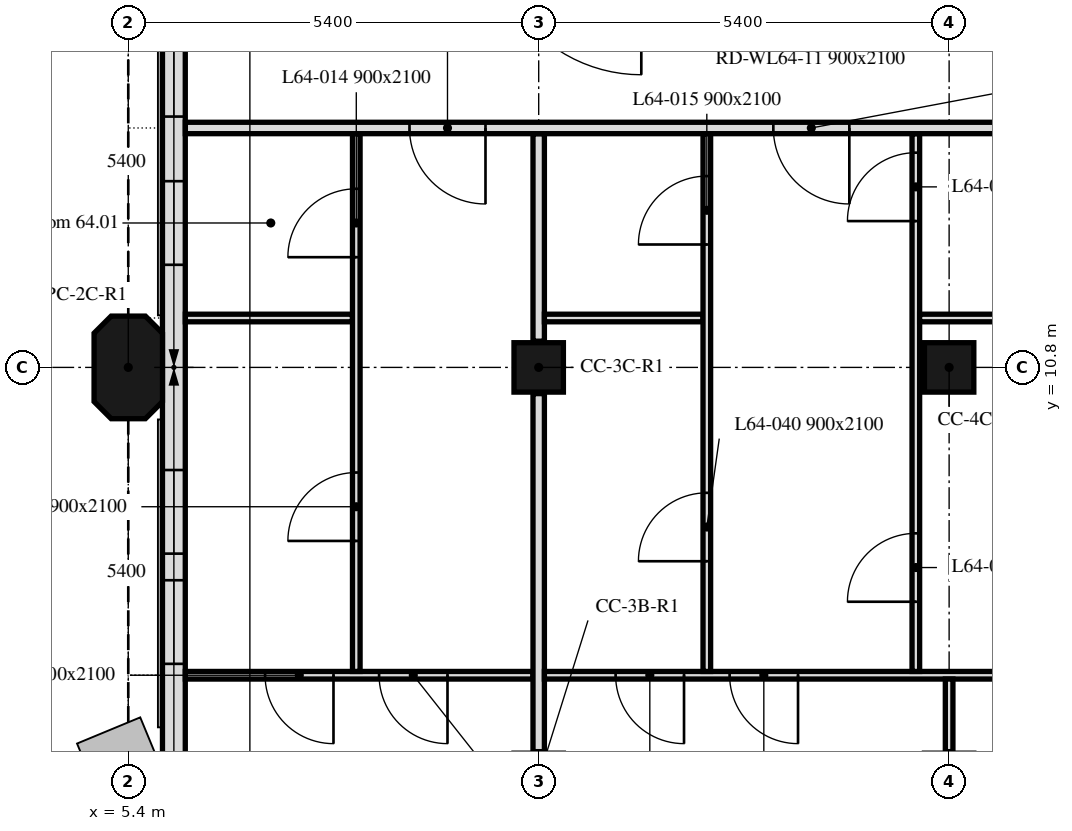
"""IFC4 building model, lengths in metres.
Left out: names, types, materials, properties, quantities, classifications, styles, units other than length and angle.
Written with IfcOpenShell. Run it as: python <this file> out.ifc"""

import sys

from ifc_helpers import new_model, si_unit, direction, frame, frame_2d, origin, origin_2d, place, context, subcontext, project, spatial, polyline, rectangle, outline, extrude, element, fill, save


model = new_model("IFC4")
c1 = context("Model", 3, precision=1e-05, world=origin(), true_north=direction((0.0, 1.0)))
c2 = subcontext(c1, "Body", "Model", "MODEL_VIEW")
j1 = project(units=[si_unit("LENGTHUNIT", "METRE"), si_unit("PLANEANGLEUNIT", "RADIAN")], contexts=[c1])
p1 = place(None, origin())
s1 = spatial("IfcSite", under=j1, at=p1, CompositionType="ELEMENT")
p2 = place(p1, origin())
s2 = spatial("IfcBuilding", under=s1, at=p2, CompositionType="ELEMENT")
p3 = place(p2, frame((0.0, 0.0, 265.3)))
s3 = spatial("IfcBuildingStorey", under=s2, at=p3, CompositionType="ELEMENT", Elevation=265.3)
p4 = place(p3, frame((5.4, 10.8, 0.0), z_axis=(0.0, 0.0, 1.0), x_axis=(0.0, 1.0, 0.0)))
e1 = element("IfcColumn", 1, at=p4, inside=s3, PredefinedType="COLUMN", context=c2, shape_type="SweptSolid", body=[
    extrude(outline(polyline([(-0.45, -0.45), (0.45, -0.45), (0.675, -0.225), (0.675, 0.225), (0.45, 0.45), (-0.45, 0.45), (-0.675, 0.225), (-0.675, -0.225), (-0.45, -0.45)])), origin(), (0.0, 0.0, 1.0), 3.0),
])
for number, where, z_axis, x_axis in (
    (2, (10.8, 10.8, 0.0), (0.0, 0.0, 1.0), (1.0, 0.0, 0.0)),
    (3, (16.2, 10.8, 0.0), (0.0, 0.0, 1.0), (1.0, 0.0, 0.0)),
):
    element("IfcColumn", number, at=place(p3, frame(where, z_axis=z_axis, x_axis=x_axis)), inside=s3, PredefinedType="COLUMN", context=c2, shape_type="SweptSolid", body=[
        extrude(rectangle(XDim=0.65, YDim=0.65, at=origin_2d()), origin(), (0.0, 0.0, 1.0), 3.0),
    ])
p5 = place(p3, frame((6.0, 16.2, 0.0), z_axis=(0.0, 0.0, 1.0), x_axis=(0.0, -1.0, 0.0)))
e4 = element("IfcWall", 4, at=p5, inside=s3, PredefinedType="SOLIDWALL", context=c2, shape_type="SweptSolid", body=[
    extrude(rectangle(XDim=10.614, YDim=0.3, at=frame_2d((5.307, 0.0))), origin(), (0.0, 0.0, 1.0), 3.0),
])
p6 = place(p5, frame((1.0, 0.0, 0.9)))
e5 = element("IfcOpeningElement", 5, at=p6, cuts=e4, PredefinedType="OPENING", context=c2, shape_type="SweptSolid", body=[
    extrude(rectangle(XDim=1.1, YDim=1.7, at=frame_2d((0.55, 0.85))), frame((0.0, 0.16, 0.0), z_axis=(0.0, -1.0, 0.0), x_axis=(1.0, 0.0, 0.0)), (0.0, 0.0, 1.0), 0.32),
])
p7 = place(p5, frame((2.95, 0.0, 0.9)))
e6 = element("IfcOpeningElement", 6, at=p7, cuts=e4, PredefinedType="OPENING", context=c2, shape_type="SweptSolid", body=[
    extrude(rectangle(XDim=1.1, YDim=1.7, at=frame_2d((0.55, 0.85))), frame((0.0, 0.16, 0.0), z_axis=(0.0, -1.0, 0.0), x_axis=(1.0, 0.0, 0.0)), (0.0, 0.0, 1.0), 0.32),
])
p8 = place(p5, frame((6.75, 0.0, 0.9)))
e7 = element("IfcOpeningElement", 7, at=p8, cuts=e4, PredefinedType="OPENING", context=c2, shape_type="SweptSolid", body=[
    extrude(rectangle(XDim=1.1, YDim=1.7, at=frame_2d((0.55, 0.85))), frame((0.0, 0.16, 0.0), z_axis=(0.0, -1.0, 0.0), x_axis=(1.0, 0.0, 0.0)), (0.0, 0.0, 1.0), 0.32),
])
p9 = place(p5, frame((8.2, 0.0, 0.9)))
e8 = element("IfcOpeningElement", 8, at=p9, cuts=e4, PredefinedType="OPENING", context=c2, shape_type="SweptSolid", body=[
    extrude(rectangle(XDim=1.1, YDim=1.7, at=frame_2d((0.55, 0.85))), frame((0.0, 0.16, 0.0), z_axis=(0.0, -1.0, 0.0), x_axis=(1.0, 0.0, 0.0)), (0.0, 0.0, 1.0), 0.32),
])
p10 = place(p3, frame((10.725, 6.75, 0.0), z_axis=(0.0, 0.0, 1.0), x_axis=(-1.0, 0.0, 0.0)))
e9 = element("IfcWall", 9, at=p10, inside=s3, PredefinedType="PARTITIONING", context=c2, shape_type="SweptSolid", body=[
    extrude(rectangle(XDim=4.574, YDim=0.1, at=frame_2d((2.287, 0.0))), origin(), (0.0, 0.0, 1.0), 3.0),
])
p11 = place(p10, frame((2.625, 0.0, 0.0)))
e10 = element("IfcOpeningElement", 10, at=p11, cuts=e9, PredefinedType="OPENING", context=c2, shape_type="SweptSolid", body=[
    extrude(rectangle(XDim=0.9, YDim=2.1, at=frame_2d((0.45, 1.05))), frame((0.0, 0.05, 0.0), z_axis=(0.0, -1.0, 0.0), x_axis=(1.0, 0.0, 0.0)), (0.0, 0.0, 1.0), 0.1),
])
p12 = place(p10, frame((1.125, 0.0, 0.0)))
e11 = element("IfcOpeningElement", 11, at=p12, cuts=e9, PredefinedType="OPENING", context=c2, shape_type="SweptSolid", body=[
    extrude(rectangle(XDim=0.9, YDim=2.1, at=frame_2d((0.45, 1.05))), frame((0.0, 0.05, 0.0), z_axis=(0.0, -1.0, 0.0), x_axis=(1.0, 0.0, 0.0)), (0.0, 0.0, 1.0), 0.1),
])
p13 = place(p3, frame((8.35, 11.45, 0.0), z_axis=(0.0, 0.0, 1.0), x_axis=(-1.0, 0.0, 0.0)))
e12 = element("IfcWall", 12, at=p13, inside=s3, PredefinedType="PARTITIONING", context=c2, shape_type="SweptSolid", body=[
    extrude(rectangle(XDim=2.199, YDim=0.1, at=frame_2d((1.1, 0.0))), origin(), (0.0, 0.0, 1.0), 3.0),
])
p14 = place(p3, frame((8.4, 6.8, 0.0), z_axis=(0.0, 0.0, 1.0), x_axis=(0.0, 1.0, 0.0)))
e13 = element("IfcWall", 13, at=p14, inside=s3, PredefinedType="PARTITIONING", context=c2, shape_type="SweptSolid", body=[
    extrude(rectangle(XDim=7.075, YDim=0.1, at=frame_2d((3.538, 0.0))), origin(), (0.0, 0.0, 1.0), 3.0),
])
p15 = place(p14, frame((5.45, 0.0, 0.0)))
e14 = element("IfcOpeningElement", 14, at=p15, cuts=e13, PredefinedType="OPENING", context=c2, shape_type="SweptSolid", body=[
    extrude(rectangle(XDim=0.9, YDim=2.1, at=frame_2d((0.45, 1.05))), frame((0.0, 0.05, 0.0), z_axis=(0.0, -1.0, 0.0), x_axis=(1.0, 0.0, 0.0)), (0.0, 0.0, 1.0), 0.1),
])
p16 = place(p14, frame((1.717, 0.0, 0.0)))
e15 = element("IfcOpeningElement", 15, at=p16, cuts=e13, PredefinedType="OPENING", context=c2, shape_type="SweptSolid", body=[
    extrude(rectangle(XDim=0.9, YDim=2.1, at=frame_2d((0.45, 1.05))), frame((0.0, 0.05, 0.0), z_axis=(0.0, -1.0, 0.0), x_axis=(1.0, 0.0, 0.0)), (0.0, 0.0, 1.0), 0.1),
])
p17 = place(p3, frame((10.8, 5.745, 0.0), z_axis=(0.0, 0.0, 1.0), x_axis=(0.0, 1.0, 0.0)))
e16 = element("IfcWall", 16, at=p17, inside=s3, PredefinedType="PARTITIONING", context=c2, shape_type="SweptSolid", body=[
    extrude(rectangle(XDim=4.71, YDim=0.15, at=frame_2d((2.355, 0.0))), origin(), (0.0, 0.0, 1.0), 3.0),
])
p18 = place(p3, frame((10.8, 11.145, 0.0), z_axis=(0.0, 0.0, 1.0), x_axis=(0.0, 1.0, 0.0)))
e17 = element("IfcWall", 17, at=p18, inside=s3, PredefinedType="PARTITIONING", context=c2, shape_type="SweptSolid", body=[
    extrude(rectangle(XDim=2.73, YDim=0.15, at=frame_2d((1.365, 0.0))), origin(), (0.0, 0.0, 1.0), 3.0),
])
p19 = place(p3, frame((21.525, 6.75, 0.0), z_axis=(0.0, 0.0, 1.0), x_axis=(-1.0, 0.0, 0.0)))
e18 = element("IfcWall", 18, at=p19, inside=s3, PredefinedType="PARTITIONING", context=c2, shape_type="SweptSolid", body=[
    extrude(rectangle(XDim=10.65, YDim=0.1, at=frame_2d((5.325, 0.0))), origin(), (0.0, 0.0, 1.0), 2.4),
])
p20 = place(p19, frame((8.813, 0.0, 0.0)))
e19 = element("IfcOpeningElement", 19, at=p20, cuts=e18, PredefinedType="OPENING", context=c2, shape_type="SweptSolid", body=[
    extrude(rectangle(XDim=0.9, YDim=2.1, at=frame_2d((0.45, 1.05))), frame((0.0, 0.05, 0.0), z_axis=(0.0, -1.0, 0.0), x_axis=(1.0, 0.0, 0.0)), (0.0, 0.0, 1.0), 0.1),
])
p21 = place(p19, frame((1.675, 0.0, 0.0)))
e20 = element("IfcOpeningElement", 20, at=p21, cuts=e18, PredefinedType="OPENING", context=c2, shape_type="SweptSolid", body=[
    extrude(rectangle(XDim=0.9, YDim=2.1, at=frame_2d((0.45, 1.05))), frame((0.0, 0.05, 0.0), z_axis=(0.0, -1.0, 0.0), x_axis=(1.0, 0.0, 0.0)), (0.0, 0.0, 1.0), 0.1),
])
p22 = place(p19, frame((7.313, 0.0, 0.0)))
e21 = element("IfcOpeningElement", 21, at=p22, cuts=e18, PredefinedType="OPENING", context=c2, shape_type="SweptSolid", body=[
    extrude(rectangle(XDim=0.9, YDim=2.1, at=frame_2d((0.45, 1.05))), frame((0.0, 0.05, 0.0), z_axis=(0.0, -1.0, 0.0), x_axis=(1.0, 0.0, 0.0)), (0.0, 0.0, 1.0), 0.1),
])
p23 = place(p3, frame((16.2, 5.745, 0.0), z_axis=(0.0, 0.0, 1.0), x_axis=(0.0, 1.0, 0.0)))
e22 = element("IfcWall", 22, at=p23, inside=s3, PredefinedType="PARTITIONING", context=c2, shape_type="SweptSolid", body=[
    extrude(rectangle(XDim=0.955, YDim=0.1, at=frame_2d((0.478, 0.0))), origin(), (0.0, 0.0, 1.0), 2.4),
])
p24 = place(p3, frame((12.962, 11.45, 0.0), z_axis=(0.0, 0.0, 1.0), x_axis=(-1.0, 0.0, 0.0)))
e23 = element("IfcWall", 23, at=p24, inside=s3, PredefinedType="PARTITIONING", context=c2, shape_type="SweptSolid", body=[
    extrude(rectangle(XDim=2.087, YDim=0.1, at=frame_2d((1.043, 0.0))), origin(), (0.0, 0.0, 1.0), 3.0),
])
p25 = place(p3, frame((13.012, 6.8, 0.0), z_axis=(0.0, 0.0, 1.0), x_axis=(0.0, 1.0, 0.0)))
e24 = element("IfcWall", 24, at=p25, inside=s3, PredefinedType="PARTITIONING", context=c2, shape_type="SweptSolid", body=[
    extrude(rectangle(XDim=7.075, YDim=0.1, at=frame_2d((3.538, 0.0))), origin(), (0.0, 0.0, 1.0), 3.0),
])
p26 = place(p25, frame((5.617, 0.0, 0.0)))
e25 = element("IfcOpeningElement", 25, at=p26, cuts=e24, PredefinedType="OPENING", context=c2, shape_type="SweptSolid", body=[
    extrude(rectangle(XDim=0.9, YDim=2.1, at=frame_2d((0.45, 1.05))), frame((0.0, 0.05, 0.0), z_axis=(0.0, -1.0, 0.0), x_axis=(1.0, 0.0, 0.0)), (0.0, 0.0, 1.0), 0.1),
])
p27 = place(p25, frame((1.45, 0.0, 0.0)))
e26 = element("IfcOpeningElement", 26, at=p27, cuts=e24, PredefinedType="OPENING", context=c2, shape_type="SweptSolid", body=[
    extrude(rectangle(XDim=0.9, YDim=2.1, at=frame_2d((0.45, 1.05))), frame((0.0, 0.05, 0.0), z_axis=(0.0, -1.0, 0.0), x_axis=(1.0, 0.0, 0.0)), (0.0, 0.0, 1.0), 0.1),
])
p28 = place(p3, frame((15.762, 6.8, 0.0), z_axis=(0.0, 0.0, 1.0), x_axis=(0.0, 1.0, 0.0)))
e27 = element("IfcWall", 27, at=p28, inside=s3, PredefinedType="PARTITIONING", context=c2, shape_type="SweptSolid", body=[
    extrude(rectangle(XDim=7.075, YDim=0.1, at=frame_2d((3.538, 0.0))), origin(), (0.0, 0.0, 1.0), 3.0),
])
p29 = place(p28, frame((0.917, 0.0, 0.0)))
e28 = element("IfcOpeningElement", 28, at=p29, cuts=e27, PredefinedType="OPENING", context=c2, shape_type="SweptSolid", body=[
    extrude(rectangle(XDim=0.9, YDim=2.1, at=frame_2d((0.45, 1.05))), frame((0.0, 0.05, 0.0), z_axis=(0.0, -1.0, 0.0), x_axis=(1.0, 0.0, 0.0)), (0.0, 0.0, 1.0), 0.1),
])
p30 = place(p28, frame((5.925, 0.0, 0.0)))
e29 = element("IfcOpeningElement", 29, at=p30, cuts=e27, PredefinedType="OPENING", context=c2, shape_type="SweptSolid", body=[
    extrude(rectangle(XDim=0.9, YDim=2.1, at=frame_2d((0.45, 1.05))), frame((0.0, 0.05, 0.0), z_axis=(0.0, -1.0, 0.0), x_axis=(1.0, 0.0, 0.0)), (0.0, 0.0, 1.0), 0.1),
])
p31 = place(p3, frame((21.525, 11.45, 0.0), z_axis=(0.0, 0.0, 1.0), x_axis=(-1.0, 0.0, 0.0)))
e30 = element("IfcWall", 30, at=p31, inside=s3, PredefinedType="PARTITIONING", context=c2, shape_type="SweptSolid", body=[
    extrude(rectangle(XDim=5.713, YDim=0.1, at=frame_2d((2.856, 0.0))), origin(), (0.0, 0.0, 1.0), 2.4),
])
p32 = place(p31, frame((1.675, 0.0, 0.0)))
e31 = element("IfcOpeningElement", 31, at=p32, cuts=e30, PredefinedType="OPENING", context=c2, shape_type="SweptSolid", body=[
    extrude(rectangle(XDim=0.9, YDim=2.1, at=frame_2d((0.45, 1.05))), frame((0.0, 0.05, 0.0), z_axis=(0.0, -1.0, 0.0), x_axis=(1.0, 0.0, 0.0)), (0.0, 0.0, 1.0), 0.1),
])
p33 = place(p3, frame((47.849, 13.95, 0.0), z_axis=(0.0, 0.0, 1.0), x_axis=(-1.0, 0.0, 0.0)))
e32 = element("IfcWall", 32, at=p33, inside=s3, PredefinedType="PARTITIONING", context=c2, shape_type="SweptSolid", body=[
    extrude(rectangle(XDim=41.698, YDim=0.15, at=frame_2d((20.849, 0.0))), origin(), (0.0, 0.0, 1.0), 2.4),
])
p34 = place(p33, frame((37.749, 0.0, 0.0)))
e33 = element("IfcOpeningElement", 33, at=p34, cuts=e32, PredefinedType="OPENING", context=c2, shape_type="SweptSolid", body=[
    extrude(rectangle(XDim=1.0, YDim=2.1, at=frame_2d((0.5, 1.05))), frame((0.0, 0.075, 0.0), z_axis=(0.0, -1.0, 0.0), x_axis=(1.0, 0.0, 0.0)), (0.0, 0.0, 1.0), 0.15),
])
p35 = place(p33, frame((32.962, 0.0, 0.0)))
e34 = element("IfcOpeningElement", 34, at=p35, cuts=e32, PredefinedType="OPENING", context=c2, shape_type="SweptSolid", body=[
    extrude(rectangle(XDim=1.0, YDim=2.1, at=frame_2d((0.5, 1.05))), frame((0.0, 0.075, 0.0), z_axis=(0.0, -1.0, 0.0), x_axis=(1.0, 0.0, 0.0)), (0.0, 0.0, 1.0), 0.15),
])
p36 = place(p33, frame((22.179, 0.0, 0.0)))
e35 = element("IfcOpeningElement", 35, at=p36, cuts=e32, PredefinedType="OPENING", context=c2, shape_type="SweptSolid", body=[
    extrude(rectangle(XDim=1.0, YDim=2.1, at=frame_2d((0.5, 1.05))), frame((0.0, 0.075, 0.0), z_axis=(0.0, -1.0, 0.0), x_axis=(1.0, 0.0, 0.0)), (0.0, 0.0, 1.0), 0.15),
])
p37 = place(p33, frame((9.193, 0.0, 0.0)))
e36 = element("IfcOpeningElement", 36, at=p37, cuts=e32, PredefinedType="OPENING", context=c2, shape_type="SweptSolid", body=[
    extrude(rectangle(XDim=1.0, YDim=2.1, at=frame_2d((0.5, 1.05))), frame((0.0, 0.075, 0.0), z_axis=(0.0, -1.0, 0.0), x_axis=(1.0, 0.0, 0.0)), (0.0, 0.0, 1.0), 0.15),
])
p38 = place(p6, origin())
e37 = element("IfcWindow", 37, at=p38, inside=s3, PartitioningType="SINGLE_PANEL", PredefinedType="WINDOW", context=c2, shape_type="SweptSolid", body=[
    extrude(rectangle(XDim=1.1, YDim=1.7, at=frame_2d((0.55, 0.85))), frame((0.0, 0.03, 0.0), z_axis=(0.0, -1.0, 0.0), x_axis=(1.0, 0.0, 0.0)), (0.0, 0.0, 1.0), 0.06),
])
fill(e5, e37)
p39 = place(p7, origin())
e38 = element("IfcWindow", 38, at=p39, inside=s3, PartitioningType="SINGLE_PANEL", PredefinedType="WINDOW", context=c2, shape_type="SweptSolid", body=[
    extrude(rectangle(XDim=1.1, YDim=1.7, at=frame_2d((0.55, 0.85))), frame((0.0, 0.03, 0.0), z_axis=(0.0, -1.0, 0.0), x_axis=(1.0, 0.0, 0.0)), (0.0, 0.0, 1.0), 0.06),
])
fill(e6, e38)
p40 = place(p8, origin())
e39 = element("IfcWindow", 39, at=p40, inside=s3, PartitioningType="SINGLE_PANEL", PredefinedType="WINDOW", context=c2, shape_type="SweptSolid", body=[
    extrude(rectangle(XDim=1.1, YDim=1.7, at=frame_2d((0.55, 0.85))), frame((0.0, 0.03, 0.0), z_axis=(0.0, -1.0, 0.0), x_axis=(1.0, 0.0, 0.0)), (0.0, 0.0, 1.0), 0.06),
])
fill(e7, e39)
p41 = place(p9, origin())
e40 = element("IfcWindow", 40, at=p41, inside=s3, PartitioningType="SINGLE_PANEL", PredefinedType="WINDOW", context=c2, shape_type="SweptSolid", body=[
    extrude(rectangle(XDim=1.1, YDim=1.7, at=frame_2d((0.55, 0.85))), frame((0.0, 0.03, 0.0), z_axis=(0.0, -1.0, 0.0), x_axis=(1.0, 0.0, 0.0)), (0.0, 0.0, 1.0), 0.06),
])
fill(e8, e40)
p42 = place(p15, origin())
e41 = element("IfcDoor", 41, at=p42, inside=s3, OperationType="SINGLE_SWING_RIGHT", PredefinedType="DOOR", context=c2, shape_type="SweptSolid", body=[
    extrude(rectangle(XDim=0.9, YDim=2.1, at=frame_2d((0.45, 1.05))), frame((0.0, 0.025, 0.0), z_axis=(0.0, -1.0, 0.0), x_axis=(1.0, 0.0, 0.0)), (0.0, 0.0, 1.0), 0.05),
])
fill(e14, e41)
p43 = place(p26, origin())
e42 = element("IfcDoor", 42, at=p43, inside=s3, OperationType="SINGLE_SWING_LEFT", PredefinedType="DOOR", context=c2, shape_type="SweptSolid", body=[
    extrude(rectangle(XDim=0.9, YDim=2.1, at=frame_2d((0.45, 1.05))), frame((0.0, 0.025, 0.0), z_axis=(0.0, -1.0, 0.0), x_axis=(1.0, 0.0, 0.0)), (0.0, 0.0, 1.0), 0.05),
])
fill(e25, e42)
p44 = place(p29, origin())
e43 = element("IfcDoor", 43, at=p44, inside=s3, OperationType="SINGLE_SWING_RIGHT", PredefinedType="DOOR", context=c2, shape_type="SweptSolid", body=[
    extrude(rectangle(XDim=0.9, YDim=2.1, at=frame_2d((0.45, 1.05))), frame((0.0, 0.025, 0.0), z_axis=(0.0, -1.0, 0.0), x_axis=(1.0, 0.0, 0.0)), (0.0, 0.0, 1.0), 0.05),
])
fill(e28, e43)
p45 = place(p30, origin())
e44 = element("IfcDoor", 44, at=p45, inside=s3, OperationType="SINGLE_SWING_RIGHT", PredefinedType="DOOR", context=c2, shape_type="SweptSolid", body=[
    extrude(rectangle(XDim=0.9, YDim=2.1, at=frame_2d((0.45, 1.05))), frame((0.0, 0.025, 0.0), z_axis=(0.0, -1.0, 0.0), x_axis=(1.0, 0.0, 0.0)), (0.0, 0.0, 1.0), 0.05),
])
fill(e29, e44)
p46 = place(p11, origin())
e45 = element("IfcDoor", 45, at=p46, inside=s3, OperationType="SINGLE_SWING_RIGHT", PredefinedType="DOOR", context=c2, shape_type="SweptSolid", body=[
    extrude(rectangle(XDim=0.9, YDim=2.1, at=frame_2d((0.45, 1.05))), frame((0.0, 0.025, 0.0), z_axis=(0.0, -1.0, 0.0), x_axis=(1.0, 0.0, 0.0)), (0.0, 0.0, 1.0), 0.05),
])
fill(e10, e45)
p47 = place(p16, origin())
e46 = element("IfcDoor", 46, at=p47, inside=s3, OperationType="SINGLE_SWING_LEFT", PredefinedType="DOOR", context=c2, shape_type="SweptSolid", body=[
    extrude(rectangle(XDim=0.9, YDim=2.1, at=frame_2d((0.45, 1.05))), frame((0.0, 0.025, 0.0), z_axis=(0.0, -1.0, 0.0), x_axis=(1.0, 0.0, 0.0)), (0.0, 0.0, 1.0), 0.05),
])
fill(e15, e46)
p48 = place(p20, origin())
e47 = element("IfcDoor", 47, at=p48, inside=s3, OperationType="SINGLE_SWING_RIGHT", PredefinedType="DOOR", context=c2, shape_type="SweptSolid", body=[
    extrude(rectangle(XDim=0.9, YDim=2.1, at=frame_2d((0.45, 1.05))), frame((0.0, 0.025, 0.0), z_axis=(0.0, -1.0, 0.0), x_axis=(1.0, 0.0, 0.0)), (0.0, 0.0, 1.0), 0.05),
])
fill(e19, e47)
p49 = place(p27, origin())
e48 = element("IfcDoor", 48, at=p49, inside=s3, OperationType="SINGLE_SWING_RIGHT", PredefinedType="DOOR", context=c2, shape_type="SweptSolid", body=[
    extrude(rectangle(XDim=0.9, YDim=2.1, at=frame_2d((0.45, 1.05))), frame((0.0, 0.025, 0.0), z_axis=(0.0, -1.0, 0.0), x_axis=(1.0, 0.0, 0.0)), (0.0, 0.0, 1.0), 0.05),
])
fill(e26, e48)
p50 = place(p12, origin())
e49 = element("IfcDoor", 49, at=p50, inside=s3, OperationType="SINGLE_SWING_LEFT", PredefinedType="DOOR", context=c2, shape_type="SweptSolid", body=[
    extrude(rectangle(XDim=0.9, YDim=2.1, at=frame_2d((0.45, 1.05))), frame((0.0, 0.025, 0.0), z_axis=(0.0, -1.0, 0.0), x_axis=(1.0, 0.0, 0.0)), (0.0, 0.0, 1.0), 0.05),
])
fill(e11, e49)
p51 = place(p22, origin())
e50 = element("IfcDoor", 50, at=p51, inside=s3, OperationType="SINGLE_SWING_LEFT", PredefinedType="DOOR", context=c2, shape_type="SweptSolid", body=[
    extrude(rectangle(XDim=0.9, YDim=2.1, at=frame_2d((0.45, 1.05))), frame((0.0, 0.025, 0.0), z_axis=(0.0, -1.0, 0.0), x_axis=(1.0, 0.0, 0.0)), (0.0, 0.0, 1.0), 0.05),
])
fill(e21, e50)
p52 = place(p34, origin())
e51 = element("IfcDoor", 51, at=p52, inside=s3, OperationType="SINGLE_SWING_LEFT", PredefinedType="DOOR", context=c2, shape_type="SweptSolid", body=[
    extrude(rectangle(XDim=1.0, YDim=2.1, at=frame_2d((0.5, 1.05))), frame((0.0, 0.025, 0.0), z_axis=(0.0, -1.0, 0.0), x_axis=(1.0, 0.0, 0.0)), (0.0, 0.0, 1.0), 0.05),
])
fill(e33, e51)
p53 = place(p35, origin())
e52 = element("IfcDoor", 52, at=p53, inside=s3, OperationType="SINGLE_SWING_LEFT", PredefinedType="DOOR", context=c2, shape_type="SweptSolid", body=[
    extrude(rectangle(XDim=1.0, YDim=2.1, at=frame_2d((0.5, 1.05))), frame((0.0, 0.025, 0.0), z_axis=(0.0, -1.0, 0.0), x_axis=(1.0, 0.0, 0.0)), (0.0, 0.0, 1.0), 0.05),
])
fill(e34, e52)
save(model, sys.argv[1])
